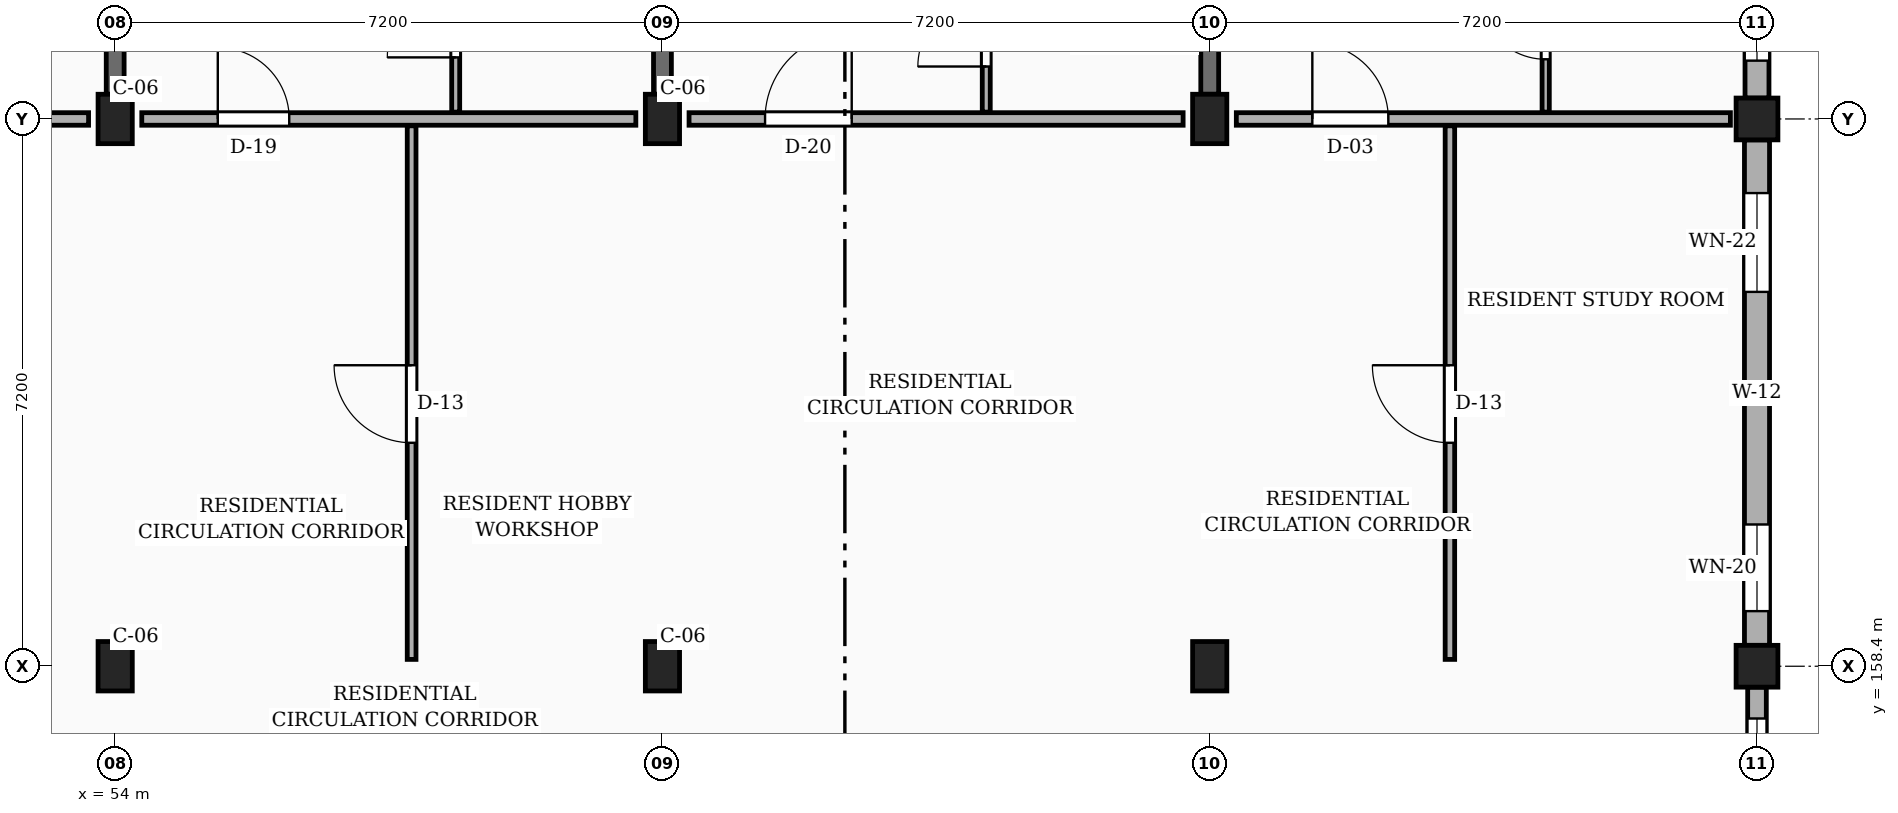
"""IFC4 building model, lengths in metres.
Left out: names, types, materials, properties, quantities, classifications, styles, units other than length and angle.
Written with IfcOpenShell. Run it as: python <this file> out.ifc"""

import sys

from ifc_helpers import new_model, si_unit, direction, frame, frame_2d, origin, origin_2d, place, context, subcontext, project, spatial, rectangle, extrude, element, fill, save


model = new_model("IFC4")
c1 = context("Model", 3, precision=1e-05, world=origin(), true_north=direction((0.0, 1.0)))
c2 = subcontext(c1, "Body", "Model", "MODEL_VIEW")
j1 = project(units=[si_unit("LENGTHUNIT", "METRE"), si_unit("PLANEANGLEUNIT", "RADIAN")], contexts=[c1])
p1 = place(None, origin())
s1 = spatial("IfcSite", under=j1, at=p1, CompositionType="ELEMENT")
p2 = place(p1, origin())
s2 = spatial("IfcBuilding", under=s1, at=p2, CompositionType="ELEMENT")
p3 = place(p2, frame((0.0, 0.0, 17.1)))
s3 = spatial("IfcBuildingStorey", under=s2, at=p3, CompositionType="ELEMENT", Elevation=17.1)
for number, where, z_axis, x_axis in (
    (1, (54.0, 158.4, 0.0), (0.0, 0.0, 1.0), (1.0, 0.0, 0.0)),
    (2, (54.0, 165.6, 0.0), (0.0, 0.0, 1.0), (1.0, 0.0, 0.0)),
    (3, (61.2, 158.4, 0.0), (0.0, 0.0, 1.0), (1.0, 0.0, 0.0)),
    (4, (61.2, 165.6, 0.0), (0.0, 0.0, 1.0), (1.0, 0.0, 0.0)),
    (5, (68.4, 158.4, 0.0), (0.0, 0.0, 1.0), (1.0, 0.0, 0.0)),
    (6, (68.4, 165.6, 0.0), (0.0, 0.0, 1.0), (1.0, 0.0, 0.0)),
):
    element("IfcColumn", number, at=place(p3, frame(where, z_axis=z_axis, x_axis=x_axis)), inside=s3, PredefinedType="COLUMN", context=c2, shape_type="SweptSolid", body=[
        extrude(rectangle(XDim=0.45, YDim=0.65, at=origin_2d()), origin(), (0.0, 0.0, 1.0), 3.15),
    ])
for number, where, z_axis, x_axis in (
    (7, (75.6, 158.4, 0.0), (0.0, 0.0, 1.0), (1.0, 0.0, 0.0)),
    (8, (75.6, 165.6, 0.0), (0.0, 0.0, 1.0), (1.0, 0.0, 0.0)),
):
    element("IfcColumn", number, at=place(p3, frame(where, z_axis=z_axis, x_axis=x_axis)), inside=s3, PredefinedType="COLUMN", context=c2, shape_type="SweptSolid", body=[
        extrude(rectangle(XDim=0.55, YDim=0.55, at=origin_2d()), origin(), (0.0, 0.0, 1.0), 3.15),
    ])
for number, where, z_axis, x_axis in (
    (9, (54.0, 165.925, 0.0), (0.0, 0.0, 1.0), (0.0, 1.0, 0.0)),
    (10, (61.2, 165.925, 0.0), (0.0, 0.0, 1.0), (0.0, 1.0, 0.0)),
    (11, (68.4, 165.925, 0.0), (0.0, 0.0, 1.0), (0.0, 1.0, 0.0)),
):
    element("IfcWall", number, at=place(p3, frame(where, z_axis=z_axis, x_axis=x_axis)), inside=s3, PredefinedType="SOLIDWALL", context=c2, shape_type="SweptSolid", body=[
        extrude(rectangle(XDim=6.6, YDim=0.235, at=frame_2d((3.3, 0.0))), origin(), (0.0, 0.0, 1.0), 2.185),
    ])
p4 = place(p3, frame((75.6, 151.475, 0.0), z_axis=(0.0, 0.0, 1.0), x_axis=(0.0, 1.0, 0.0)))
e12 = element("IfcWall", 12, at=p4, inside=s3, PredefinedType="SOLIDWALL", context=c2, shape_type="SweptSolid", body=[
    extrude(rectangle(XDim=6.65, YDim=0.245, at=frame_2d((3.325, 0.0))), origin(), (0.0, 0.0, 1.0), 2.455),
])
p5 = place(p4, frame((2.02, 0.0, 0.78)))
e13 = element("IfcOpeningElement", 13, at=p5, cuts=e12, PredefinedType="OPENING", context=c2, shape_type="SweptSolid", body=[
    extrude(rectangle(XDim=0.98, YDim=1.36, at=frame_2d((0.49, 0.68))), frame((0.0, 0.133, 0.0), z_axis=(0.0, -1.0, 0.0), x_axis=(1.0, 0.0, 0.0)), (0.0, 0.0, 1.0), 0.265),
])
p6 = place(p4, frame((5.097, 0.0, 0.78)))
e14 = element("IfcOpeningElement", 14, at=p6, cuts=e12, PredefinedType="OPENING", context=c2, shape_type="SweptSolid", body=[
    extrude(rectangle(XDim=1.14, YDim=1.36, at=frame_2d((0.57, 0.68))), frame((0.0, 0.133, 0.0), z_axis=(0.0, -1.0, 0.0), x_axis=(1.0, 0.0, 0.0)), (0.0, 0.0, 1.0), 0.265),
])
p7 = place(p3, frame((75.6, 158.675, 0.0), z_axis=(0.0, 0.0, 1.0), x_axis=(0.0, 1.0, 0.0)))
e15 = element("IfcWall", 15, at=p7, inside=s3, PredefinedType="SOLIDWALL", context=c2, shape_type="SweptSolid", body=[
    extrude(rectangle(XDim=6.65, YDim=0.33, at=frame_2d((3.325, 0.0))), origin(), (0.0, 0.0, 1.0), 2.455),
])
p8 = place(p7, frame((0.45, 0.0, 0.78)))
e16 = element("IfcOpeningElement", 16, at=p8, cuts=e15, PredefinedType="OPENING", context=c2, shape_type="SweptSolid", body=[
    extrude(rectangle(XDim=1.14, YDim=1.36, at=frame_2d((0.57, 0.68))), frame((0.0, 0.175, 0.0), z_axis=(0.0, -1.0, 0.0), x_axis=(1.0, 0.0, 0.0)), (0.0, 0.0, 1.0), 0.35),
])
p9 = place(p7, frame((4.65, 0.0, 0.78)))
e17 = element("IfcOpeningElement", 17, at=p9, cuts=e15, PredefinedType="OPENING", context=c2, shape_type="SweptSolid", body=[
    extrude(rectangle(XDim=1.3, YDim=1.36, at=frame_2d((0.65, 0.68))), frame((0.0, 0.175, 0.0), z_axis=(0.0, -1.0, 0.0), x_axis=(1.0, 0.0, 0.0)), (0.0, 0.0, 1.0), 0.35),
])
p10 = place(p3, frame((75.6, 165.875, 0.0), z_axis=(0.0, 0.0, 1.0), x_axis=(0.0, 1.0, 0.0)))
e18 = element("IfcWall", 18, at=p10, inside=s3, PredefinedType="SOLIDWALL", context=c2, shape_type="SweptSolid", body=[
    extrude(rectangle(XDim=6.65, YDim=0.315, at=frame_2d((3.325, 0.0))), origin(), (0.0, 0.0, 1.0), 2.455),
])
p11 = place(p10, frame((0.492, 0.0, 0.78)))
e19 = element("IfcOpeningElement", 19, at=p11, cuts=e18, PredefinedType="OPENING", context=c2, shape_type="SweptSolid", body=[
    extrude(rectangle(XDim=1.3, YDim=1.36, at=frame_2d((0.65, 0.68))), frame((0.0, 0.167, 0.0), z_axis=(0.0, -1.0, 0.0), x_axis=(1.0, 0.0, 0.0)), (0.0, 0.0, 1.0), 0.335),
])
p12 = place(p10, frame((3.597, 0.0, 0.78)))
e20 = element("IfcOpeningElement", 20, at=p12, cuts=e18, PredefinedType="OPENING", context=c2, shape_type="SweptSolid", body=[
    extrude(rectangle(XDim=1.46, YDim=1.36, at=frame_2d((0.73, 0.68))), frame((0.0, 0.167, 0.0), z_axis=(0.0, -1.0, 0.0), x_axis=(1.0, 0.0, 0.0)), (0.0, 0.0, 1.0), 0.335),
])
p13 = place(p3, frame((47.15, 165.6, 0.0), z_axis=(0.0, 0.0, 1.0), x_axis=(1.0, 0.0, 0.0)))
e21 = element("IfcWall", 21, at=p13, inside=s3, PredefinedType="PARTITIONING", context=c2, shape_type="SweptSolid", body=[
    extrude(rectangle(XDim=6.5, YDim=0.165, at=frame_2d((3.25, 0.0))), origin(), (0.0, 0.0, 1.0), 2.235),
])
p14 = place(p13, frame((1.0, 0.0, 0.0)))
e22 = element("IfcOpeningElement", 22, at=p14, cuts=e21, PredefinedType="OPENING", context=c2, shape_type="SweptSolid", body=[
    extrude(rectangle(XDim=1.0, YDim=2.15, at=frame_2d((0.5, 1.075))), frame((0.0, 0.093, 0.0), z_axis=(0.0, -1.0, 0.0), x_axis=(1.0, 0.0, 0.0)), (0.0, 0.0, 1.0), 0.185),
])
p15 = place(p3, frame((54.35, 165.6, 0.0), z_axis=(0.0, 0.0, 1.0), x_axis=(1.0, 0.0, 0.0)))
e23 = element("IfcWall", 23, at=p15, inside=s3, PredefinedType="PARTITIONING", context=c2, shape_type="SweptSolid", body=[
    extrude(rectangle(XDim=6.5, YDim=0.165, at=frame_2d((3.25, 0.0))), origin(), (0.0, 0.0, 1.0), 2.235),
])
p16 = place(p15, frame((1.0, 0.0, 0.0)))
e24 = element("IfcOpeningElement", 24, at=p16, cuts=e23, PredefinedType="OPENING", context=c2, shape_type="SweptSolid", body=[
    extrude(rectangle(XDim=0.94, YDim=2.12, at=frame_2d((0.47, 1.06))), frame((0.0, 0.093, 0.0), z_axis=(0.0, -1.0, 0.0), x_axis=(1.0, 0.0, 0.0)), (0.0, 0.0, 1.0), 0.185),
])
p17 = place(p3, frame((61.55, 165.6, 0.0), z_axis=(0.0, 0.0, 1.0), x_axis=(1.0, 0.0, 0.0)))
e25 = element("IfcWall", 25, at=p17, inside=s3, PredefinedType="PARTITIONING", context=c2, shape_type="SweptSolid", body=[
    extrude(rectangle(XDim=6.5, YDim=0.165, at=frame_2d((3.25, 0.0))), origin(), (0.0, 0.0, 1.0), 2.235),
])
p18 = place(p17, frame((1.0, 0.0, 0.0)))
e26 = element("IfcOpeningElement", 26, at=p18, cuts=e25, PredefinedType="OPENING", context=c2, shape_type="SweptSolid", body=[
    extrude(rectangle(XDim=1.14, YDim=2.18, at=frame_2d((0.57, 1.09))), frame((0.0, 0.093, 0.0), z_axis=(0.0, -1.0, 0.0), x_axis=(1.0, 0.0, 0.0)), (0.0, 0.0, 1.0), 0.185),
])
p19 = place(p3, frame((68.75, 165.6, 0.0), z_axis=(0.0, 0.0, 1.0), x_axis=(1.0, 0.0, 0.0)))
e27 = element("IfcWall", 27, at=p19, inside=s3, PredefinedType="PARTITIONING", context=c2, shape_type="SweptSolid", body=[
    extrude(rectangle(XDim=6.5, YDim=0.165, at=frame_2d((3.25, 0.0))), origin(), (0.0, 0.0, 1.0), 2.235),
])
p20 = place(p19, frame((1.0, 0.0, 0.0)))
e28 = element("IfcOpeningElement", 28, at=p20, cuts=e27, PredefinedType="OPENING", context=c2, shape_type="SweptSolid", body=[
    extrude(rectangle(XDim=1.0, YDim=2.15, at=frame_2d((0.5, 1.075))), frame((0.0, 0.093, 0.0), z_axis=(0.0, -1.0, 0.0), x_axis=(1.0, 0.0, 0.0)), (0.0, 0.0, 1.0), 0.185),
])
p21 = place(p3, frame((57.9, 158.49, 0.0), z_axis=(0.0, 0.0, 1.0), x_axis=(0.0, 1.0, 0.0)))
e29 = element("IfcWall", 29, at=p21, inside=s3, PredefinedType="PARTITIONING", context=c2, shape_type="SweptSolid", body=[
    extrude(rectangle(XDim=7.02, YDim=0.115, at=frame_2d((3.51, 0.0))), origin(), (0.0, 0.0, 1.0), 2.32),
])
p22 = place(p21, frame((2.85, 0.0, 0.0)))
e30 = element("IfcOpeningElement", 30, at=p22, cuts=e29, PredefinedType="OPENING", context=c2, shape_type="SweptSolid", body=[
    extrude(rectangle(XDim=1.02, YDim=2.15, at=frame_2d((0.51, 1.075))), frame((0.0, 0.067, 0.0), z_axis=(0.0, -1.0, 0.0), x_axis=(1.0, 0.0, 0.0)), (0.0, 0.0, 1.0), 0.135),
])
p23 = place(p3, frame((58.48, 165.69, 0.0), z_axis=(0.0, 0.0, 1.0), x_axis=(0.0, 1.0, 0.0)))
e31 = element("IfcWall", 31, at=p23, inside=s3, PredefinedType="PARTITIONING", context=c2, shape_type="SweptSolid", body=[
    extrude(rectangle(XDim=2.34, YDim=0.105, at=frame_2d((1.17, 0.0))), origin(), (0.0, 0.0, 1.0), 2.32),
])
p24 = place(p23, frame((0.72, 0.0, 0.0)))
e32 = element("IfcOpeningElement", 32, at=p24, cuts=e31, PredefinedType="OPENING", context=c2, shape_type="SweptSolid", body=[
    extrude(rectangle(XDim=0.9, YDim=2.05, at=frame_2d((0.45, 1.025))), frame((0.0, 0.062, 0.0), z_axis=(0.0, -1.0, 0.0), x_axis=(1.0, 0.0, 0.0)), (0.0, 0.0, 1.0), 0.125),
])
p25 = place(p3, frame((65.46, 165.69, 0.0), z_axis=(0.0, 0.0, 1.0), x_axis=(0.0, 1.0, 0.0)))
e33 = element("IfcWall", 33, at=p25, inside=s3, PredefinedType="PARTITIONING", context=c2, shape_type="SweptSolid", body=[
    extrude(rectangle(XDim=2.1, YDim=0.105, at=frame_2d((1.05, 0.0))), origin(), (0.0, 0.0, 1.0), 2.32),
])
p26 = place(p25, frame((0.6, 0.0, 0.0)))
e34 = element("IfcOpeningElement", 34, at=p26, cuts=e33, PredefinedType="OPENING", context=c2, shape_type="SweptSolid", body=[
    extrude(rectangle(XDim=0.9, YDim=2.05, at=frame_2d((0.45, 1.025))), frame((0.0, 0.062, 0.0), z_axis=(0.0, -1.0, 0.0), x_axis=(1.0, 0.0, 0.0)), (0.0, 0.0, 1.0), 0.125),
])
p27 = place(p3, frame((71.56, 158.49, 0.0), z_axis=(0.0, 0.0, 1.0), x_axis=(0.0, 1.0, 0.0)))
e35 = element("IfcWall", 35, at=p27, inside=s3, PredefinedType="PARTITIONING", context=c2, shape_type="SweptSolid", body=[
    extrude(rectangle(XDim=7.02, YDim=0.125, at=frame_2d((3.51, 0.0))), origin(), (0.0, 0.0, 1.0), 2.32),
])
p28 = place(p27, frame((2.85, 0.0, 0.0)))
e36 = element("IfcOpeningElement", 36, at=p28, cuts=e35, PredefinedType="OPENING", context=c2, shape_type="SweptSolid", body=[
    extrude(rectangle(XDim=1.02, YDim=2.15, at=frame_2d((0.51, 1.075))), frame((0.0, 0.073, 0.0), z_axis=(0.0, -1.0, 0.0), x_axis=(1.0, 0.0, 0.0)), (0.0, 0.0, 1.0), 0.145),
])
p29 = place(p3, frame((72.82, 165.69, 0.0), z_axis=(0.0, 0.0, 1.0), x_axis=(0.0, 1.0, 0.0)))
e37 = element("IfcWall", 37, at=p29, inside=s3, PredefinedType="PARTITIONING", context=c2, shape_type="SweptSolid", body=[
    extrude(rectangle(XDim=2.26, YDim=0.095, at=frame_2d((1.13, 0.0))), origin(), (0.0, 0.0, 1.0), 2.32),
])
p30 = place(p29, frame((0.695, 0.0, 0.0)))
e38 = element("IfcOpeningElement", 38, at=p30, cuts=e37, PredefinedType="OPENING", context=c2, shape_type="SweptSolid", body=[
    extrude(rectangle(XDim=0.87, YDim=2.05, at=frame_2d((0.435, 1.025))), frame((0.0, 0.058, 0.0), z_axis=(0.0, -1.0, 0.0), x_axis=(1.0, 0.0, 0.0)), (0.0, 0.0, 1.0), 0.115),
])
p31 = place(p6, origin())
e39 = element("IfcWindow", 39, at=p31, inside=s3, PartitioningType="SINGLE_PANEL", PredefinedType="WINDOW", context=c2, shape_type="SweptSolid", body=[
    extrude(rectangle(XDim=1.14, YDim=1.36, at=frame_2d((0.57, 0.68))), frame((0.0, 0.03, 0.0), z_axis=(0.0, -1.0, 0.0), x_axis=(1.0, 0.0, 0.0)), (0.0, 0.0, 1.0), 0.06),
])
fill(e14, e39)
p32 = place(p8, origin())
e40 = element("IfcWindow", 40, at=p32, inside=s3, PartitioningType="SINGLE_PANEL", PredefinedType="WINDOW", context=c2, shape_type="SweptSolid", body=[
    extrude(rectangle(XDim=1.14, YDim=1.36, at=frame_2d((0.57, 0.68))), frame((0.0, 0.03, 0.0), z_axis=(0.0, -1.0, 0.0), x_axis=(1.0, 0.0, 0.0)), (0.0, 0.0, 1.0), 0.06),
])
fill(e16, e40)
p33 = place(p9, origin())
e41 = element("IfcWindow", 41, at=p33, inside=s3, PartitioningType="SINGLE_PANEL", PredefinedType="WINDOW", context=c2, shape_type="SweptSolid", body=[
    extrude(rectangle(XDim=1.3, YDim=1.36, at=frame_2d((0.65, 0.68))), frame((0.0, 0.03, 0.0), z_axis=(0.0, -1.0, 0.0), x_axis=(1.0, 0.0, 0.0)), (0.0, 0.0, 1.0), 0.06),
])
fill(e17, e41)
p34 = place(p11, origin())
e42 = element("IfcWindow", 42, at=p34, inside=s3, PartitioningType="SINGLE_PANEL", PredefinedType="WINDOW", context=c2, shape_type="SweptSolid", body=[
    extrude(rectangle(XDim=1.3, YDim=1.36, at=frame_2d((0.65, 0.68))), frame((0.0, 0.03, 0.0), z_axis=(0.0, -1.0, 0.0), x_axis=(1.0, 0.0, 0.0)), (0.0, 0.0, 1.0), 0.06),
])
fill(e19, e42)
p35 = place(p16, origin())
e43 = element("IfcDoor", 43, at=p35, inside=s3, OperationType="SINGLE_SWING_LEFT", PredefinedType="DOOR", context=c2, shape_type="SweptSolid", body=[
    extrude(rectangle(XDim=0.94, YDim=2.12, at=frame_2d((0.47, 1.06))), frame((0.0, 0.025, 0.0), z_axis=(0.0, -1.0, 0.0), x_axis=(1.0, 0.0, 0.0)), (0.0, 0.0, 1.0), 0.05),
])
fill(e24, e43)
p36 = place(p18, origin())
e44 = element("IfcDoor", 44, at=p36, inside=s3, OperationType="SINGLE_SWING_RIGHT", PredefinedType="DOOR", context=c2, shape_type="SweptSolid", body=[
    extrude(rectangle(XDim=1.14, YDim=2.18, at=frame_2d((0.57, 1.09))), frame((0.0, 0.025, 0.0), z_axis=(0.0, -1.0, 0.0), x_axis=(1.0, 0.0, 0.0)), (0.0, 0.0, 1.0), 0.05),
])
fill(e26, e44)
p37 = place(p20, origin())
e45 = element("IfcDoor", 45, at=p37, inside=s3, OperationType="SINGLE_SWING_LEFT", PredefinedType="DOOR", context=c2, shape_type="SweptSolid", body=[
    extrude(rectangle(XDim=1.0, YDim=2.15, at=frame_2d((0.5, 1.075))), frame((0.0, 0.025, 0.0), z_axis=(0.0, -1.0, 0.0), x_axis=(1.0, 0.0, 0.0)), (0.0, 0.0, 1.0), 0.05),
])
fill(e28, e45)
p38 = place(p22, origin())
e46 = element("IfcDoor", 46, at=p38, inside=s3, OperationType="SINGLE_SWING_RIGHT", PredefinedType="DOOR", context=c2, shape_type="SweptSolid", body=[
    extrude(rectangle(XDim=1.02, YDim=2.15, at=frame_2d((0.51, 1.075))), frame((0.0, 0.025, 0.0), z_axis=(0.0, -1.0, 0.0), x_axis=(1.0, 0.0, 0.0)), (0.0, 0.0, 1.0), 0.05),
])
fill(e30, e46)
p39 = place(p24, origin())
e47 = element("IfcDoor", 47, at=p39, inside=s3, OperationType="SINGLE_SWING_LEFT", PredefinedType="DOOR", context=c2, shape_type="SweptSolid", body=[
    extrude(rectangle(XDim=0.9, YDim=2.05, at=frame_2d((0.45, 1.025))), frame((0.0, 0.025, 0.0), z_axis=(0.0, -1.0, 0.0), x_axis=(1.0, 0.0, 0.0)), (0.0, 0.0, 1.0), 0.05),
])
fill(e32, e47)
p40 = place(p26, origin())
e48 = element("IfcDoor", 48, at=p40, inside=s3, OperationType="SINGLE_SWING_LEFT", PredefinedType="DOOR", context=c2, shape_type="SweptSolid", body=[
    extrude(rectangle(XDim=0.9, YDim=2.05, at=frame_2d((0.45, 1.025))), frame((0.0, 0.025, 0.0), z_axis=(0.0, -1.0, 0.0), x_axis=(1.0, 0.0, 0.0)), (0.0, 0.0, 1.0), 0.05),
])
fill(e34, e48)
p41 = place(p28, origin())
e49 = element("IfcDoor", 49, at=p41, inside=s3, OperationType="SINGLE_SWING_RIGHT", PredefinedType="DOOR", context=c2, shape_type="SweptSolid", body=[
    extrude(rectangle(XDim=1.02, YDim=2.15, at=frame_2d((0.51, 1.075))), frame((0.0, 0.025, 0.0), z_axis=(0.0, -1.0, 0.0), x_axis=(1.0, 0.0, 0.0)), (0.0, 0.0, 1.0), 0.05),
])
fill(e36, e49)
p42 = place(p30, origin())
e50 = element("IfcDoor", 50, at=p42, inside=s3, OperationType="SINGLE_SWING_RIGHT", PredefinedType="DOOR", context=c2, shape_type="SweptSolid", body=[
    extrude(rectangle(XDim=0.87, YDim=2.05, at=frame_2d((0.435, 1.025))), frame((0.0, 0.025, 0.0), z_axis=(0.0, -1.0, 0.0), x_axis=(1.0, 0.0, 0.0)), (0.0, 0.0, 1.0), 0.05),
])
fill(e38, e50)
save(model, sys.argv[1])
